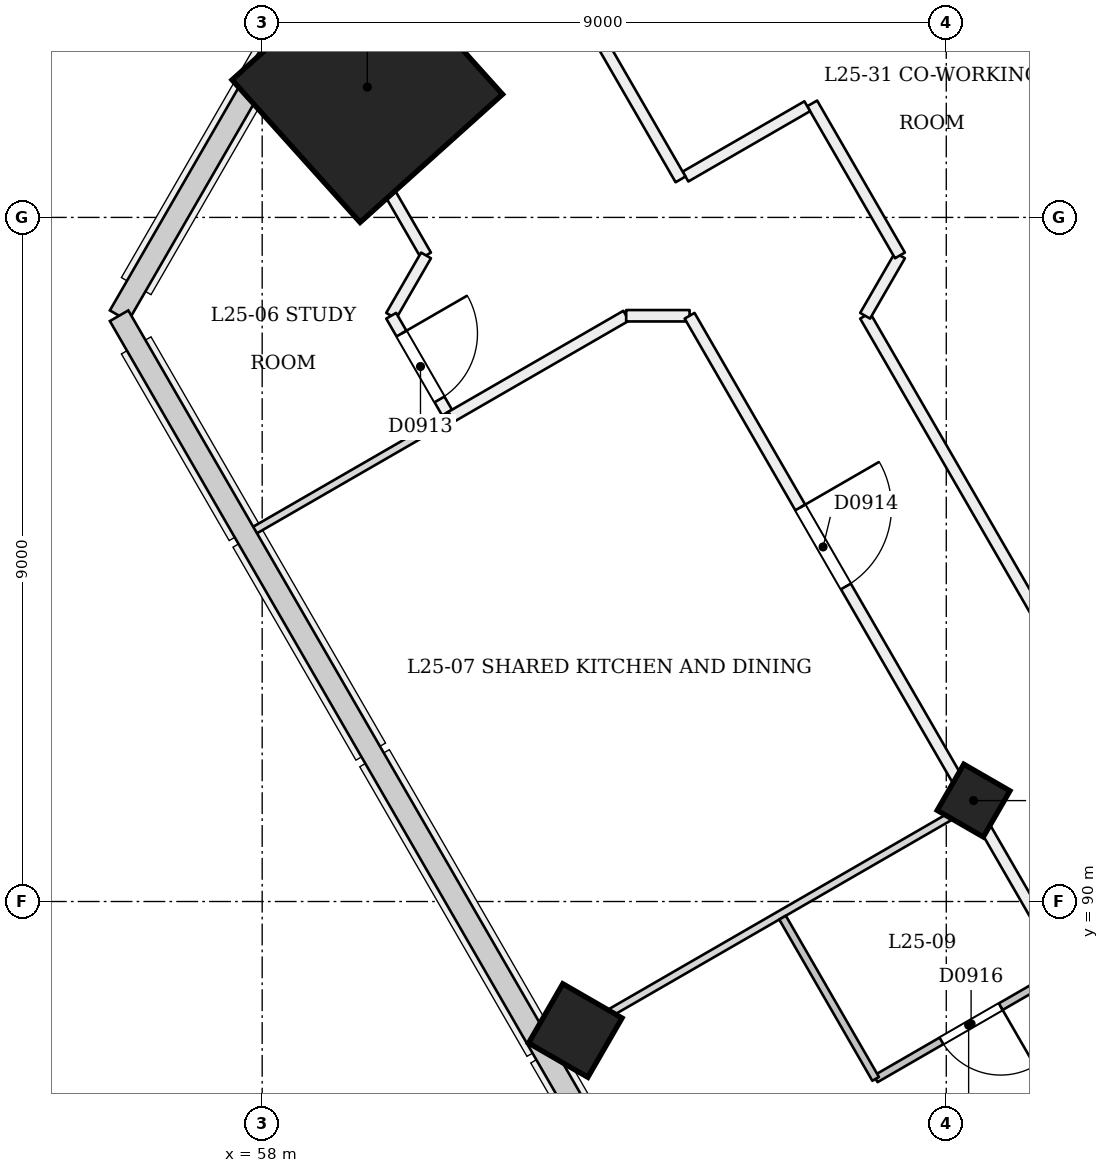
"""IFC4 building model, lengths in metres.
Left out: names, types, materials, properties, quantities, classifications, styles, units other than length and angle.
Written with IfcOpenShell. Run it as: python <this file> out.ifc"""

import sys

from ifc_helpers import new_model, si_unit, direction, frame, frame_2d, origin, origin_2d, place, context, subcontext, project, spatial, rectangle, extrude, element, fill, save


model = new_model("IFC4")
c1 = context("Model", 3, precision=1e-05, world=origin(), true_north=direction((0.0, 1.0)))
c2 = subcontext(c1, "Body", "Model", "MODEL_VIEW")
j1 = project(units=[si_unit("LENGTHUNIT", "METRE"), si_unit("PLANEANGLEUNIT", "RADIAN")], contexts=[c1])
p1 = place(None, origin())
s1 = spatial("IfcSite", under=j1, at=p1, CompositionType="ELEMENT")
p2 = place(p1, origin())
s2 = spatial("IfcBuilding", under=s1, at=p2, CompositionType="ELEMENT")
p3 = place(p2, frame((0.0, 0.0, 100.8)))
s3 = spatial("IfcBuildingStorey", under=s2, at=p3, CompositionType="ELEMENT", Elevation=100.8)
p4 = place(p3, frame((67.332, 91.281, -0.021), z_axis=(0.02215519141, 0.038415882353, 0.999016199807), x_axis=(-0.865364621668, -0.499668992839, 0.038405327245)))
e1 = element("IfcColumn", 1, at=p4, inside=s3, PredefinedType="COLUMN", context=c2, shape_type="SweptSolid", body=[
    extrude(rectangle(XDim=0.7, YDim=0.7, at=origin_2d()), origin(), (0.0, 0.0, 1.0), 3.604),
])
p5 = place(p3, frame((59.349, 100.703, 0.0), z_axis=(0.028403739082, 0.009219352065, 0.999554016126), x_axis=(-0.865121500753, 0.501164983388, 0.019961171317)))
e2 = element("IfcColumn", 2, at=p5, inside=s3, PredefinedType="COLUMN", context=c2, shape_type="SweptSolid", body=[
    extrude(rectangle(XDim=2.52, YDim=2.52, at=origin_2d()), origin(), (0.0, 0.0, 1.0), 3.602),
])
p6 = place(p3, frame((62.093, 88.257, 0.0), z_axis=(0.022186675517, 0.038434148665, 0.999014798512), x_axis=(-0.865568283213, -0.499314007513, 0.038432655342)))
e3 = element("IfcColumn", 3, at=p6, inside=s3, PredefinedType="COLUMN", context=c2, shape_type="SweptSolid", body=[
    extrude(rectangle(XDim=0.9, YDim=0.9, at=origin_2d()), origin(), (0.0, 0.0, 1.0), 3.576),
])
p7 = place(p3, frame((61.739, 102.407, 0.0), z_axis=(0.0, 0.0, 1.0), x_axis=(-0.866002163101, -0.500040251884, 0.0)))
e4 = element("IfcWall", 4, at=p7, inside=s3, PredefinedType="PARTITIONING", context=c2, shape_type="SweptSolid", body=[
    extrude(rectangle(XDim=3.325, YDim=0.15, at=frame_2d((1.663, 0.0))), origin(), (0.0, 0.0, 1.0), 2.6),
])
p8 = place(p3, frame((58.897, 100.679, 0.0), z_axis=(0.0, 0.0, 1.0), x_axis=(0.500072327845, -0.865983641256, 0.0)))
e5 = element("IfcWall", 5, at=p8, inside=s3, PredefinedType="PARTITIONING", context=c2, shape_type="SweptSolid", body=[
    extrude(rectangle(XDim=2.517, YDim=0.15, at=frame_2d((1.258, 0.0))), origin(), (0.0, 0.0, 1.0), 2.6),
])
p9 = place(p3, frame((60.156, 98.5, 0.0), z_axis=(0.0, 0.0, 1.0), x_axis=(-0.500206595639, -0.865906092876, 0.0)))
e6 = element("IfcWall", 6, at=p9, inside=s3, PredefinedType="PARTITIONING", context=c2, shape_type="SweptSolid", body=[
    extrude(rectangle(XDim=0.917, YDim=0.15, at=frame_2d((0.458, 0.0))), origin(), (0.0, 0.0, 1.0), 2.6),
])
p10 = place(p3, frame((59.697, 97.706, 0.0), z_axis=(0.0, 0.0, 1.0), x_axis=(0.500048082433, -0.865997641599, 0.0)))
e7 = element("IfcWall", 7, at=p10, inside=s3, PredefinedType="PARTITIONING", context=c2, shape_type="SweptSolid", body=[
    extrude(rectangle(XDim=1.471, YDim=0.15, at=frame_2d((0.735, 0.0))), origin(), (0.0, 0.0, 1.0), 2.6),
])
p11 = place(p10, frame((0.271, 0.0, 0.0)))
e8 = element("IfcOpeningElement", 8, at=p11, cuts=e7, PredefinedType="OPENING", context=c2, shape_type="SweptSolid", body=[
    extrude(rectangle(XDim=1.0, YDim=2.1, at=frame_2d((0.5, 1.05))), frame((0.0, 0.085, 0.0), z_axis=(0.0, -1.0, 0.0), x_axis=(1.0, 0.0, 0.0)), (0.0, 0.0, 1.0), 0.171),
])
p12 = place(p3, frame((60.453, 96.357, 0.0), z_axis=(0.0, 0.0, 1.0), x_axis=(0.866012264611, 0.500022757025, 0.0)))
e9 = element("IfcWall", 9, at=p12, inside=s3, PredefinedType="PARTITIONING", context=c2, shape_type="SweptSolid", body=[
    extrude(rectangle(XDim=2.698, YDim=0.15, at=frame_2d((1.349, 0.0))), origin(), (0.0, 0.0, 1.0), 2.6),
])
p13 = place(p3, frame((62.789, 97.706, 0.0), z_axis=(0.0, 0.0, 1.0), x_axis=(1.0, 0.0, 0.0)))
e10 = element("IfcWall", 10, at=p13, inside=s3, PredefinedType="PARTITIONING", context=c2, shape_type="SweptSolid", body=[
    extrude(rectangle(XDim=0.834, YDim=0.15, at=frame_2d((0.417, 0.0))), origin(), (0.0, 0.0, 1.0), 3.1),
])
p14 = place(p3, frame((63.623, 97.706, 0.0), z_axis=(0.0, 0.0, 1.0), x_axis=(0.500000781663, -0.866024952491, 0.0)))
e11 = element("IfcWall", 11, at=p14, inside=s3, PredefinedType="PARTITIONING", context=c2, shape_type="SweptSolid", body=[
    extrude(rectangle(XDim=41.837, YDim=0.15, at=frame_2d((20.919, 0.0))), origin(), (0.0, 0.0, 1.0), 2.7),
])
p15 = place(p14, frame((2.912, 0.0, 0.0)))
e12 = element("IfcOpeningElement", 12, at=p15, cuts=e11, PredefinedType="OPENING", context=c2, shape_type="SweptSolid", body=[
    extrude(rectangle(XDim=1.2, YDim=2.1, at=frame_2d((0.6, 1.05))), frame((0.0, 0.085, 0.0), z_axis=(0.0, -1.0, 0.0), x_axis=(1.0, 0.0, 0.0)), (0.0, 0.0, 1.0), 0.171),
])
p16 = place(p14, frame((10.198, 0.0, 0.0)))
e13 = element("IfcOpeningElement", 13, at=p16, cuts=e11, PredefinedType="OPENING", context=c2, shape_type="SweptSolid", body=[
    extrude(rectangle(XDim=1.0, YDim=2.1, at=frame_2d((0.5, 1.05))), frame((0.0, 0.085, 0.0), z_axis=(0.0, -1.0, 0.0), x_axis=(1.0, 0.0, 0.0)), (0.0, 0.0, 1.0), 0.171),
])
p17 = place(p14, frame((12.523, 0.0, 0.0)))
e14 = element("IfcOpeningElement", 14, at=p17, cuts=e11, PredefinedType="OPENING", context=c2, shape_type="SweptSolid", body=[
    extrude(rectangle(XDim=1.0, YDim=2.1, at=frame_2d((0.5, 1.05))), frame((0.0, 0.085, 0.0), z_axis=(0.0, -1.0, 0.0), x_axis=(1.0, 0.0, 0.0)), (0.0, 0.0, 1.0), 0.171),
])
p18 = place(p14, frame((19.314, 0.0, 0.0)))
e15 = element("IfcOpeningElement", 15, at=p18, cuts=e11, PredefinedType="OPENING", context=c2, shape_type="SweptSolid", body=[
    extrude(rectangle(XDim=1.0, YDim=2.1, at=frame_2d((0.5, 1.05))), frame((0.0, 0.085, 0.0), z_axis=(0.0, -1.0, 0.0), x_axis=(1.0, 0.0, 0.0)), (0.0, 0.0, 1.0), 0.171),
])
p19 = place(p14, frame((21.639, 0.0, 0.0)))
e16 = element("IfcOpeningElement", 16, at=p19, cuts=e11, PredefinedType="OPENING", context=c2, shape_type="SweptSolid", body=[
    extrude(rectangle(XDim=1.0, YDim=2.1, at=frame_2d((0.5, 1.05))), frame((0.0, 0.085, 0.0), z_axis=(0.0, -1.0, 0.0), x_axis=(1.0, 0.0, 0.0)), (0.0, 0.0, 1.0), 0.171),
])
p20 = place(p14, frame((27.169, 0.0, 0.0)))
e17 = element("IfcOpeningElement", 17, at=p20, cuts=e11, PredefinedType="OPENING", context=c2, shape_type="SweptSolid", body=[
    extrude(rectangle(XDim=1.0, YDim=2.1, at=frame_2d((0.5, 1.05))), frame((0.0, 0.085, 0.0), z_axis=(0.0, -1.0, 0.0), x_axis=(1.0, 0.0, 0.0)), (0.0, 0.0, 1.0), 0.171),
])
p21 = place(p14, frame((30.523, 0.0, 0.0)))
e18 = element("IfcOpeningElement", 18, at=p21, cuts=e11, PredefinedType="OPENING", context=c2, shape_type="SweptSolid", body=[
    extrude(rectangle(XDim=1.0, YDim=2.1, at=frame_2d((0.5, 1.05))), frame((0.0, 0.085, 0.0), z_axis=(0.0, -1.0, 0.0), x_axis=(1.0, 0.0, 0.0)), (0.0, 0.0, 1.0), 0.171),
])
p22 = place(p14, frame((37.725, 0.0, 0.0)))
e19 = element("IfcOpeningElement", 19, at=p22, cuts=e11, PredefinedType="OPENING", context=c2, shape_type="SweptSolid", body=[
    extrude(rectangle(XDim=1.2, YDim=2.1, at=frame_2d((0.6, 1.05))), frame((0.0, 0.085, 0.0), z_axis=(0.0, -1.0, 0.0), x_axis=(1.0, 0.0, 0.0)), (0.0, 0.0, 1.0), 0.171),
])
p23 = place(p3, frame((68.996, 92.4, 0.0), z_axis=(0.0, 0.0, 1.0), x_axis=(-0.499978838982, 0.866037620759, 0.0)))
e20 = element("IfcWall", 20, at=p23, inside=s3, PredefinedType="PARTITIONING", context=c2, shape_type="SweptSolid", body=[
    extrude(rectangle(XDim=6.127, YDim=0.15, at=frame_2d((3.063, 0.0))), origin(), (0.0, 0.0, 1.0), 3.1),
])
p24 = place(p3, frame((65.933, 97.706, 0.0), z_axis=(0.0, 0.0, 1.0), x_axis=(0.500006847747, 0.8660214502, 0.0)))
e21 = element("IfcWall", 21, at=p24, inside=s3, PredefinedType="PARTITIONING", context=c2, shape_type="SweptSolid", body=[
    extrude(rectangle(XDim=0.917, YDim=0.15, at=frame_2d((0.458, 0.0))), origin(), (0.0, 0.0, 1.0), 3.1),
])
p25 = place(p3, frame((66.391, 98.5, 0.0), z_axis=(0.0, 0.0, 1.0), x_axis=(-0.500027479704, 0.866009537788, 0.0)))
e22 = element("IfcWall", 22, at=p25, inside=s3, PredefinedType="PARTITIONING", context=c2, shape_type="SweptSolid", body=[
    extrude(rectangle(XDim=2.309, YDim=0.15, at=frame_2d((1.155, 0.0))), origin(), (0.0, 0.0, 1.0), 3.1),
])
p26 = place(p3, frame((65.171, 100.462, 0.0), z_axis=(0.0, 0.0, 1.0), x_axis=(-0.866058118026, -0.49994333299, 0.0)))
e23 = element("IfcWall", 23, at=p26, inside=s3, PredefinedType="PARTITIONING", context=c2, shape_type="SweptSolid", body=[
    extrude(rectangle(XDim=1.85, YDim=0.15, at=frame_2d((0.925, 0.0))), origin(), (0.0, 0.0, 1.0), 3.1),
])
p27 = place(p3, frame((63.504, 99.5, 0.0), z_axis=(0.0, 0.0, 1.0), x_axis=(-0.50003140069, 0.866007273829, 0.0)))
e24 = element("IfcWall", 24, at=p27, inside=s3, PredefinedType="PARTITIONING", context=c2, shape_type="SweptSolid", body=[
    extrude(rectangle(XDim=3.42, YDim=0.15, at=frame_2d((1.71, 0.0))), origin(), (0.0, 0.0, 1.0), 2.6),
])
p28 = place(p3, frame((57.854, 94.857, 0.0), z_axis=(0.0, 0.0, 1.0), x_axis=(0.866068011996, 0.49992619315, 0.0)))
e25 = element("IfcWall", 25, at=p28, inside=s3, PredefinedType="PARTITIONING", context=c2, shape_type="SweptSolid", body=[
    extrude(rectangle(XDim=2.628, YDim=0.1, at=frame_2d((1.314, 0.0))), origin(), (0.0, 0.0, 1.0), 3.1),
])
p29 = place(p3, frame((60.13, 96.171, 0.0), z_axis=(0.0, 0.0, 1.0), x_axis=(0.865790956991, 0.500405854075, 0.0)))
e26 = element("IfcWall", 26, at=p29, inside=s3, PredefinedType="PARTITIONING", context=c2, shape_type="SweptSolid", body=[
    extrude(rectangle(XDim=0.412, YDim=0.1, at=frame_2d((0.206, 0.0))), origin(), (0.0, 0.0, 1.0), 2.6),
])
p30 = place(p3, frame((61.79, 88.082, 0.0), z_axis=(0.0, 0.0, 1.0), x_axis=(0.866015887322, 0.500016482634, 0.0)))
e27 = element("IfcWall", 27, at=p30, inside=s3, PredefinedType="PARTITIONING", context=c2, shape_type="SweptSolid", body=[
    extrude(rectangle(XDim=6.325, YDim=0.1, at=frame_2d((3.163, 0.0))), origin(), (0.0, 0.0, 1.0), 2.6),
])
p31 = place(p3, frame((68.518, 89.079, 0.0), z_axis=(0.0, 0.0, 1.0), x_axis=(-0.866048868473, -0.499959355765, 0.0)))
e28 = element("IfcWall", 28, at=p31, inside=s3, PredefinedType="PARTITIONING", context=c2, shape_type="SweptSolid", body=[
    extrude(rectangle(XDim=2.825, YDim=0.1, at=frame_2d((1.413, 0.0))), origin(), (0.0, 0.0, 1.0), 3.1),
])
p32 = place(p31, frame((0.925, 0.0, 0.0)))
e29 = element("IfcOpeningElement", 29, at=p32, cuts=e28, PredefinedType="OPENING", context=c2, shape_type="SweptSolid", body=[
    extrude(rectangle(XDim=0.9, YDim=2.1, at=frame_2d((0.45, 1.05))), frame((0.0, 0.061, 0.0), z_axis=(0.0, -1.0, 0.0), x_axis=(1.0, 0.0, 0.0)), (0.0, 0.0, 1.0), 0.121),
])
p33 = place(p3, frame((66.071, 87.667, 0.0), z_axis=(0.0, 0.0, 1.0), x_axis=(-0.500018594424, 0.866014668023, 0.0)))
e30 = element("IfcWall", 30, at=p33, inside=s3, PredefinedType="PARTITIONING", context=c2, shape_type="SweptSolid", body=[
    extrude(rectangle(XDim=2.45, YDim=0.1, at=frame_2d((1.225, 0.0))), origin(), (0.0, 0.0, 1.0), 2.7),
])
p34 = place(p11, origin())
e31 = element("IfcDoor", 31, at=p34, inside=s3, OperationType="SINGLE_SWING_LEFT", PredefinedType="NOTDEFINED", context=c2, shape_type="SweptSolid", body=[
    extrude(rectangle(XDim=1.0, YDim=2.1, at=frame_2d((0.5, 1.05))), frame((0.0, 0.025, 0.0), z_axis=(0.0, -1.0, 0.0), x_axis=(1.0, 0.0, 0.0)), (0.0, 0.0, 1.0), 0.05),
])
fill(e8, e31)
p35 = place(p15, origin())
e32 = element("IfcDoor", 32, at=p35, inside=s3, OperationType="SINGLE_SWING_LEFT", PredefinedType="NOTDEFINED", context=c2, shape_type="SweptSolid", body=[
    extrude(rectangle(XDim=1.2, YDim=2.1, at=frame_2d((0.6, 1.05))), frame((0.0, 0.025, 0.0), z_axis=(0.0, -1.0, 0.0), x_axis=(1.0, 0.0, 0.0)), (0.0, 0.0, 1.0), 0.05),
])
fill(e12, e32)
p36 = place(p32, origin())
e33 = element("IfcDoor", 33, at=p36, inside=s3, OperationType="SINGLE_SWING_LEFT", PredefinedType="NOTDEFINED", context=c2, shape_type="SweptSolid", body=[
    extrude(rectangle(XDim=0.9, YDim=2.1, at=frame_2d((0.45, 1.05))), frame((0.0, 0.025, 0.0), z_axis=(0.0, -1.0, 0.0), x_axis=(1.0, 0.0, 0.0)), (0.0, 0.0, 1.0), 0.05),
])
fill(e29, e33)
save(model, sys.argv[1])
